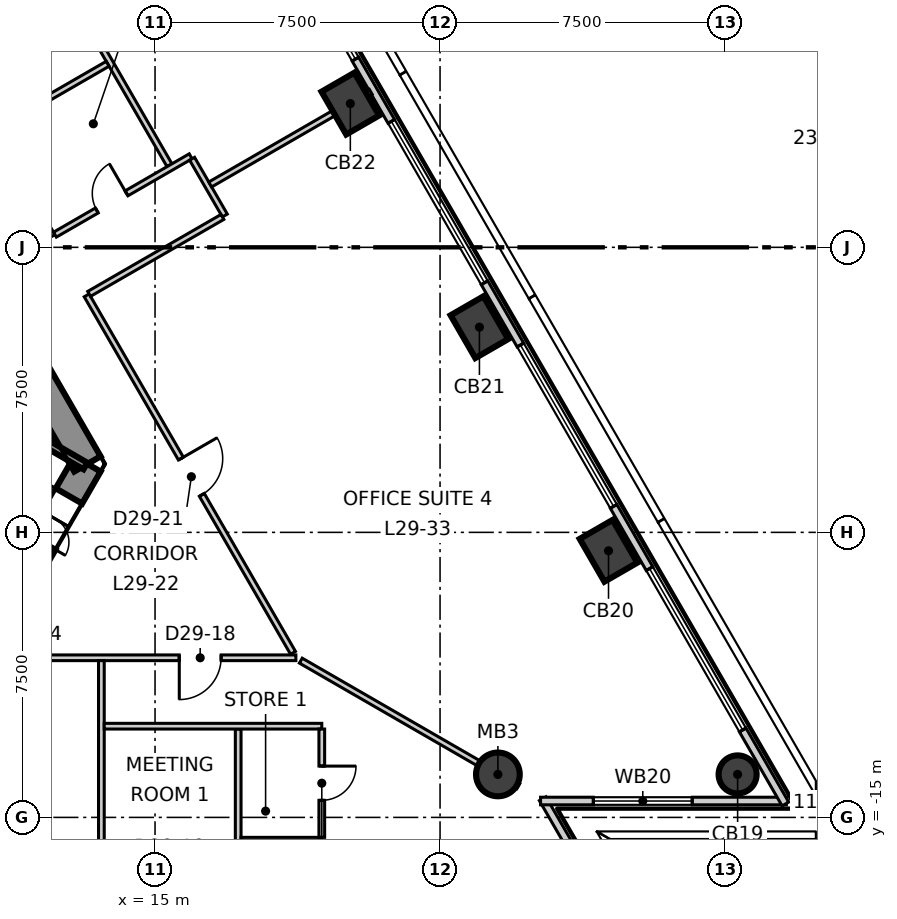
"""IFC4 building model, lengths in metres.
Left out: names, types, materials, properties, quantities, classifications, styles, units other than length and angle.
Written with IfcOpenShell. Run it as: python <this file> out.ifc"""

import sys

from ifc_helpers import new_model, si_unit, direction, frame, frame_2d, origin, origin_2d, place, context, subcontext, project, spatial, polyline, rectangle, circle, outline, extrude, element, fill, save


model = new_model("IFC4")
c1 = context("Model", 3, precision=1e-05, world=origin(), true_north=direction((0.0, 1.0)))
c2 = subcontext(c1, "Body", "Model", "MODEL_VIEW")
j1 = project(units=[si_unit("LENGTHUNIT", "METRE"), si_unit("PLANEANGLEUNIT", "RADIAN")], contexts=[c1])
p1 = place(None, origin())
s1 = spatial("IfcSite", under=j1, at=p1, CompositionType="ELEMENT")
p2 = place(p1, origin())
s2 = spatial("IfcBuilding", under=s1, at=p2, CompositionType="ELEMENT")
p3 = place(p2, frame((0.0, 0.0, 128.3)))
s3 = spatial("IfcBuildingStorey", under=s2, at=p3, CompositionType="ELEMENT", Elevation=128.3)
p4 = place(p3, frame((11.547, -8.6, -0.3), z_axis=(0.0, 0.0, 1.0), x_axis=(0.49987182685, 0.866099391942, 0.0)))
e1 = element("IfcWall", 1, at=p4, inside=s3, PredefinedType="SHEAR", context=c2, shape_type="SweptSolid", body=[
    extrude(outline(polyline([(-0.231, -0.4), (1.674, -0.4), (3.579, -0.4), (3.118, 0.4), (1.674, 0.4), (0.231, 0.4), (-0.231, -0.4)])), origin(), (0.0, 0.0, 1.0), 4.0),
])
p5 = place(p4, frame((0.974, 0.0, 0.3)))
e2 = element("IfcOpeningElement", 2, at=p5, cuts=e1, PredefinedType="OPENING", context=c2, shape_type="SweptSolid", body=[
    extrude(rectangle(XDim=1.4, YDim=2.1, at=frame_2d((0.7, 1.05))), frame((0.0, 0.41, 0.0), z_axis=(0.0, -1.0, 0.0), x_axis=(1.0, 0.0, 0.0)), (0.0, 0.0, 1.0), 0.82),
])
p6 = place(p3, frame((13.221, -5.7, -0.3), z_axis=(0.0, 0.0, 1.0), x_axis=(-0.499995765644, 0.866027848477, 0.0)))
e3 = element("IfcWall", 3, at=p6, inside=s3, PredefinedType="SHEAR", context=c2, shape_type="SweptSolid", body=[
    extrude(outline(polyline([(-0.231, -0.4), (1.732, -0.4), (3.695, -0.4), (5.658, -0.4), (7.621, -0.4), (9.584, -0.4), (11.547, -0.4), (13.51, -0.4), (15.473, -0.4), (17.436, -0.4), (19.399, -0.4), (21.362, -0.4), (23.325, -0.4), (22.863, 0.4), (20.977, 0.4), (19.091, 0.4), (17.205, 0.4), (15.319, 0.4), (13.433, 0.4), (11.547, 0.4), (9.661, 0.4), (7.775, 0.4), (5.889, 0.4), (4.003, 0.4), (2.117, 0.4), (0.231, 0.4), (-0.231, -0.4)])), origin(), (0.0, 0.0, 1.0), 4.0),
])
p7 = place(p6, frame((10.647, 0.0, 0.3)))
e4 = element("IfcOpeningElement", 4, at=p7, cuts=e3, PredefinedType="OPENING", context=c2, shape_type="SweptSolid", body=[
    extrude(rectangle(XDim=1.8, YDim=2.1, at=frame_2d((0.9, 1.05))), frame((0.0, 0.41, 0.0), z_axis=(0.0, -1.0, 0.0), x_axis=(1.0, 0.0, 0.0)), (0.0, 0.0, 1.0), 0.82),
])
p8 = place(p6, frame((17.721, 0.0, 0.3)))
e5 = element("IfcOpeningElement", 5, at=p8, cuts=e3, PredefinedType="OPENING", context=c2, shape_type="SweptSolid", body=[
    extrude(rectangle(XDim=0.9, YDim=2.1, at=frame_2d((0.45, 1.05))), frame((0.0, 0.41, 0.0), z_axis=(0.0, -1.0, 0.0), x_axis=(1.0, 0.0, 0.0)), (0.0, 0.0, 1.0), 0.82),
])
p9 = place(p3, frame((30.33, -13.869, -0.3), z_axis=(0.0, 0.0, 1.0), x_axis=(-0.5, 0.866025403784, 0.0)))
e6 = element("IfcColumn", 6, at=p9, inside=s3, PredefinedType="COLUMN", context=c2, shape_type="SweptSolid", body=[
    extrude(circle(Radius=0.5, at=origin_2d()), origin(), (0.0, 0.0, 1.0), 4.0),
])
for number, where, z_axis, x_axis in (
    (7, (26.933, -7.985, -0.3), (0.0, 0.0, 1.0), (-0.5, 0.866, 0.0)),
    (8, (23.536, -2.101, -0.3), (0.0, 0.0, 1.0), (-0.5, 0.866, 0.0)),
    (9, (20.139, 3.782, -0.3), (0.0, 0.0, 1.0), (-0.5, 0.866, 0.0)),
):
    element("IfcColumn", number, at=place(p3, frame(where, z_axis=z_axis, x_axis=x_axis)), inside=s3, PredefinedType="COLUMN", context=c2, shape_type="SweptSolid", body=[
        extrude(rectangle(XDim=1.3, YDim=1.0, at=origin_2d()), origin(), (0.0, 0.0, 1.0), 4.0),
    ])
p10 = place(p3, frame((24.022, -13.869, -0.3), z_axis=(0.0, 0.0, 1.0), x_axis=(1.0, 0.0, 0.0)))
e10 = element("IfcColumn", 10, at=p10, inside=s3, PredefinedType="COLUMN", context=c2, shape_type="SweptSolid", body=[
    extrude(circle(Radius=0.575, at=origin_2d()), origin(), (0.0, 0.0, 1.0), 4.0),
])
p11 = place(p3, frame((28.434, -20.11, 0.0), z_axis=(0.0, 0.0, 1.0), x_axis=(-0.499975110204, 0.866039773438, 0.0)))
e11 = element("IfcWall", 11, at=p11, inside=s3, PredefinedType="ELEMENTEDWALL", context=c2, shape_type="SweptSolid", body=[
    extrude(rectangle(XDim=6.469, YDim=0.2, at=frame_2d((3.234, 0.0))), origin(), (0.0, 0.0, 1.0), 3.7),
])
p12 = place(p11, frame((1.99, 0.0, 0.9)))
e12 = element("IfcOpeningElement", 12, at=p12, cuts=e11, PredefinedType="OPENING", context=c2, shape_type="SweptSolid", body=[
    extrude(rectangle(XDim=2.6, YDim=2.5, at=frame_2d((1.3, 1.25))), frame((0.0, 0.11, 0.0), z_axis=(0.0, -1.0, 0.0), x_axis=(1.0, 0.0, 0.0)), (0.0, 0.0, 1.0), 0.22),
])
p13 = place(p3, frame((25.145, -14.569, 0.0), z_axis=(0.0, 0.0, 1.0), x_axis=(1.0, 0.0, 0.0)))
e13 = element("IfcWall", 13, at=p13, inside=s3, PredefinedType="ELEMENTEDWALL", context=c2, shape_type="SweptSolid", body=[
    extrude(rectangle(XDim=6.468, YDim=0.2, at=frame_2d((3.234, 0.0))), origin(), (0.0, 0.0, 1.0), 3.7),
])
p14 = place(p13, frame((1.39, 0.0, 0.9)))
e14 = element("IfcOpeningElement", 14, at=p14, cuts=e13, PredefinedType="OPENING", context=c2, shape_type="SweptSolid", body=[
    extrude(rectangle(XDim=2.6, YDim=2.5, at=frame_2d((1.3, 1.25))), frame((0.0, 0.11, 0.0), z_axis=(0.0, -1.0, 0.0), x_axis=(1.0, 0.0, 0.0)), (0.0, 0.0, 1.0), 0.22),
])
p15 = place(p3, frame((31.588, -14.647, 0.0), z_axis=(0.0, 0.0, 1.0), x_axis=(-0.500005036527, 0.866022495925, 0.0)))
e15 = element("IfcWall", 15, at=p15, inside=s3, PredefinedType="ELEMENTEDWALL", context=c2, shape_type="SweptSolid", body=[
    extrude(rectangle(XDim=56.938, YDim=0.2, at=frame_2d((28.469, 0.0))), origin(), (0.0, 0.0, 1.0), 3.7),
])
p16 = place(p15, frame((2.25, 0.0, 0.9)))
e16 = element("IfcOpeningElement", 16, at=p16, cuts=e15, PredefinedType="OPENING", context=c2, shape_type="SweptSolid", body=[
    extrude(rectangle(XDim=4.9, YDim=2.5, at=frame_2d((2.45, 1.25))), frame((0.0, 0.11, 0.0), z_axis=(0.0, -1.0, 0.0), x_axis=(1.0, 0.0, 0.0)), (0.0, 0.0, 1.0), 0.22),
])
p17 = place(p15, frame((9.044, 0.0, 0.9)))
e17 = element("IfcOpeningElement", 17, at=p17, cuts=e15, PredefinedType="OPENING", context=c2, shape_type="SweptSolid", body=[
    extrude(rectangle(XDim=4.9, YDim=2.5, at=frame_2d((2.45, 1.25))), frame((0.0, 0.11, 0.0), z_axis=(0.0, -1.0, 0.0), x_axis=(1.0, 0.0, 0.0)), (0.0, 0.0, 1.0), 0.22),
])
p18 = place(p15, frame((15.838, 0.0, 0.9)))
e18 = element("IfcOpeningElement", 18, at=p18, cuts=e15, PredefinedType="OPENING", context=c2, shape_type="SweptSolid", body=[
    extrude(rectangle(XDim=4.9, YDim=2.5, at=frame_2d((2.45, 1.25))), frame((0.0, 0.11, 0.0), z_axis=(0.0, -1.0, 0.0), x_axis=(1.0, 0.0, 0.0)), (0.0, 0.0, 1.0), 0.22),
])
p19 = place(p15, frame((22.632, 0.0, 0.9)))
e19 = element("IfcOpeningElement", 19, at=p19, cuts=e15, PredefinedType="OPENING", context=c2, shape_type="SweptSolid", body=[
    extrude(rectangle(XDim=4.9, YDim=2.5, at=frame_2d((2.45, 1.25))), frame((0.0, 0.11, 0.0), z_axis=(0.0, -1.0, 0.0), x_axis=(1.0, 0.0, 0.0)), (0.0, 0.0, 1.0), 0.22),
])
p20 = place(p15, frame((29.426, 0.0, 0.9)))
e20 = element("IfcOpeningElement", 20, at=p20, cuts=e15, PredefinedType="OPENING", context=c2, shape_type="SweptSolid", body=[
    extrude(rectangle(XDim=4.9, YDim=2.5, at=frame_2d((2.45, 1.25))), frame((0.0, 0.11, 0.0), z_axis=(0.0, -1.0, 0.0), x_axis=(1.0, 0.0, 0.0)), (0.0, 0.0, 1.0), 0.22),
])
p21 = place(p15, frame((36.22, 0.0, 0.9)))
e21 = element("IfcOpeningElement", 21, at=p21, cuts=e15, PredefinedType="OPENING", context=c2, shape_type="SweptSolid", body=[
    extrude(rectangle(XDim=4.9, YDim=2.5, at=frame_2d((2.45, 1.25))), frame((0.0, 0.11, 0.0), z_axis=(0.0, -1.0, 0.0), x_axis=(1.0, 0.0, 0.0)), (0.0, 0.0, 1.0), 0.22),
])
p22 = place(p15, frame((43.014, 0.0, 0.9)))
e22 = element("IfcOpeningElement", 22, at=p22, cuts=e15, PredefinedType="OPENING", context=c2, shape_type="SweptSolid", body=[
    extrude(rectangle(XDim=4.9, YDim=2.5, at=frame_2d((2.45, 1.25))), frame((0.0, 0.11, 0.0), z_axis=(0.0, -1.0, 0.0), x_axis=(1.0, 0.0, 0.0)), (0.0, 0.0, 1.0), 0.22),
])
p23 = place(p15, frame((49.808, 0.0, 0.9)))
e23 = element("IfcOpeningElement", 23, at=p23, cuts=e15, PredefinedType="OPENING", context=c2, shape_type="SweptSolid", body=[
    extrude(rectangle(XDim=4.9, YDim=2.5, at=frame_2d((2.45, 1.25))), frame((0.0, 0.11, 0.0), z_axis=(0.0, -1.0, 0.0), x_axis=(1.0, 0.0, 0.0)), (0.0, 0.0, 1.0), 0.22),
])
p24 = place(p3, frame((0.901, -10.8, 0.0), z_axis=(0.0, 0.0, 1.0), x_axis=(1.0, 0.0, 0.0)))
e24 = element("IfcWall", 24, at=p24, inside=s3, PredefinedType="PARTITIONING", context=c2, shape_type="SweptSolid", body=[
    extrude(rectangle(XDim=17.805, YDim=0.15, at=frame_2d((8.903, 0.0))), origin(), (0.0, 0.0, 1.0), 3.7),
])
p25 = place(p24, frame((10.149, 0.0, 0.0)))
e25 = element("IfcOpeningElement", 25, at=p25, cuts=e24, PredefinedType="OPENING", context=c2, shape_type="SweptSolid", body=[
    extrude(rectangle(XDim=1.1, YDim=2.1, at=frame_2d((0.55, 1.05))), frame((0.0, 0.085, 0.0), z_axis=(0.0, -1.0, 0.0), x_axis=(1.0, 0.0, 0.0)), (0.0, 0.0, 1.0), 0.17),
])
p26 = place(p24, frame((4.349, 0.0, 0.0)))
e26 = element("IfcOpeningElement", 26, at=p26, cuts=e24, PredefinedType="OPENING", context=c2, shape_type="SweptSolid", body=[
    extrude(rectangle(XDim=0.9, YDim=2.1, at=frame_2d((0.45, 1.05))), frame((0.0, 0.085, 0.0), z_axis=(0.0, -1.0, 0.0), x_axis=(1.0, 0.0, 0.0)), (0.0, 0.0, 1.0), 0.17),
])
p27 = place(p24, frame((7.149, 0.0, 0.0)))
e27 = element("IfcOpeningElement", 27, at=p27, cuts=e24, PredefinedType="OPENING", context=c2, shape_type="SweptSolid", body=[
    extrude(rectangle(XDim=1.0, YDim=2.1, at=frame_2d((0.5, 1.05))), frame((0.0, 0.085, 0.0), z_axis=(0.0, -1.0, 0.0), x_axis=(1.0, 0.0, 0.0)), (0.0, 0.0, 1.0), 0.17),
])
p28 = place(p24, frame((14.737, 0.0, 0.0)))
e28 = element("IfcOpeningElement", 28, at=p28, cuts=e24, PredefinedType="OPENING", context=c2, shape_type="SweptSolid", body=[
    extrude(rectangle(XDim=1.1, YDim=2.1, at=frame_2d((0.55, 1.05))), frame((0.0, 0.085, 0.0), z_axis=(0.0, -1.0, 0.0), x_axis=(1.0, 0.0, 0.0)), (0.0, 0.0, 1.0), 0.17),
])
p29 = place(p3, frame((18.836, -10.875, 0.0), z_axis=(0.0, 0.0, 1.0), x_axis=(0.866045319897, -0.499965502695, 0.0)))
e29 = element("IfcWall", 29, at=p29, inside=s3, PredefinedType="PARTITIONING", context=c2, shape_type="SweptSolid", body=[
    extrude(rectangle(XDim=6.608, YDim=0.15, at=frame_2d((3.304, 0.0))), origin(), (0.0, 0.0, 1.0), 3.15),
])
p30 = place(p3, frame((0.076, 21.468, 0.0), z_axis=(0.0, 0.0, 1.0), x_axis=(0.50001203818, -0.866018453426, 0.0)))
e30 = element("IfcWall", 30, at=p30, inside=s3, PredefinedType="PARTITIONING", context=c2, shape_type="SweptSolid", body=[
    extrude(rectangle(XDim=24.448, YDim=0.15, at=frame_2d((12.224, 0.0))), origin(), (0.0, 0.0, 1.0), 3.7),
])
p31 = place(p30, frame((9.798, 0.0, 0.0)))
e31 = element("IfcOpeningElement", 31, at=p31, cuts=e30, PredefinedType="OPENING", context=c2, shape_type="SweptSolid", body=[
    extrude(rectangle(XDim=1.1, YDim=2.1, at=frame_2d((0.55, 1.05))), frame((0.0, 0.085, 0.0), z_axis=(0.0, -1.0, 0.0), x_axis=(1.0, 0.0, 0.0)), (0.0, 0.0, 1.0), 0.17),
])
p32 = place(p30, frame((19.198, 0.0, 0.0)))
e32 = element("IfcOpeningElement", 32, at=p32, cuts=e30, PredefinedType="OPENING", context=c2, shape_type="SweptSolid", body=[
    extrude(rectangle(XDim=0.9, YDim=2.1, at=frame_2d((0.45, 1.05))), frame((0.0, 0.085, 0.0), z_axis=(0.0, -1.0, 0.0), x_axis=(1.0, 0.0, 0.0)), (0.0, 0.0, 1.0), 0.17),
])
p33 = place(p30, frame((16.398, 0.0, 0.0)))
e33 = element("IfcOpeningElement", 33, at=p33, cuts=e30, PredefinedType="OPENING", context=c2, shape_type="SweptSolid", body=[
    extrude(rectangle(XDim=1.0, YDim=2.1, at=frame_2d((0.5, 1.05))), frame((0.0, 0.085, 0.0), z_axis=(0.0, -1.0, 0.0), x_axis=(1.0, 0.0, 0.0)), (0.0, 0.0, 1.0), 0.17),
])
p34 = place(p30, frame((1.815, 0.0, 0.0)))
e34 = element("IfcOpeningElement", 34, at=p34, cuts=e30, PredefinedType="OPENING", context=c2, shape_type="SweptSolid", body=[
    extrude(rectangle(XDim=1.1, YDim=2.1, at=frame_2d((0.55, 1.05))), frame((0.0, 0.085, 0.0), z_axis=(0.0, -1.0, 0.0), x_axis=(1.0, 0.0, 0.0)), (0.0, 0.0, 1.0), 0.17),
])
p35 = place(p3, frame((13.201, -1.264, 0.0), z_axis=(0.0, 0.0, 1.0), x_axis=(0.499973466559, -0.866040722332, 0.0)))
e35 = element("IfcWall", 35, at=p35, inside=s3, PredefinedType="PARTITIONING", context=c2, shape_type="SweptSolid", body=[
    extrude(rectangle(XDim=10.861, YDim=0.15, at=frame_2d((5.43, 0.0))), origin(), (0.0, 0.0, 1.0), 3.7),
])
p36 = place(p35, frame((4.96, 0.0, 0.0)))
e36 = element("IfcOpeningElement", 36, at=p36, cuts=e35, PredefinedType="OPENING", context=c2, shape_type="SweptSolid", body=[
    extrude(rectangle(XDim=1.1, YDim=2.1, at=frame_2d((0.55, 1.05))), frame((0.0, 0.085, 0.0), z_axis=(0.0, -1.0, 0.0), x_axis=(1.0, 0.0, 0.0)), (0.0, 0.0, 1.0), 0.17),
])
p37 = place(p3, frame((11.018, 9.717, 0.0), z_axis=(0.0, 0.0, 1.0), x_axis=(0.499888770922, -0.866089612399, 0.0)))
e37 = element("IfcWall", 37, at=p37, inside=s3, PredefinedType="PARTITIONING", context=c2, shape_type="SweptSolid", body=[
    extrude(rectangle(XDim=8.726, YDim=0.15, at=frame_2d((4.363, 0.0))), origin(), (0.0, 0.0, 1.0), 3.7),
])
p38 = place(p3, frame((10.765, 3.104, 0.0), z_axis=(0.0, 0.0, 1.0), x_axis=(0.866031223622, 0.49998991961, 0.0)))
e38 = element("IfcWall", 38, at=p38, inside=s3, PredefinedType="PARTITIONING", context=c2, shape_type="SweptSolid", body=[
    extrude(rectangle(XDim=3.45, YDim=0.15, at=frame_2d((1.725, 0.0))), origin(), (0.0, 0.0, 1.0), 3.7),
])
p39 = place(p3, frame((12.366, 0.333, 0.0), z_axis=(0.0, 0.0, 1.0), x_axis=(0.865997263264, 0.500048737644, 0.0)))
e39 = element("IfcWall", 39, at=p39, inside=s3, PredefinedType="PARTITIONING", context=c2, shape_type="SweptSolid", body=[
    extrude(rectangle(XDim=4.124, YDim=0.15, at=frame_2d((2.062, 0.0))), origin(), (0.0, 0.0, 1.0), 3.7),
])
p40 = place(p39, frame((1.274, 0.0, 0.0)))
e40 = element("IfcOpeningElement", 40, at=p40, cuts=e39, PredefinedType="OPENING", context=c2, shape_type="SweptSolid", body=[
    extrude(rectangle(XDim=0.9, YDim=2.1, at=frame_2d((0.45, 1.05))), frame((0.0, 0.085, 0.0), z_axis=(0.0, -1.0, 0.0), x_axis=(1.0, 0.0, 0.0)), (0.0, 0.0, 1.0), 0.17),
])
p41 = place(p3, frame((13.588, -19.952, 0.0), z_axis=(0.0, 0.0, 1.0), x_axis=(0.0, 1.0, 0.0)))
e41 = element("IfcWall", 41, at=p41, inside=s3, PredefinedType="PARTITIONING", context=c2, shape_type="SweptSolid", body=[
    extrude(rectangle(XDim=9.077, YDim=0.15, at=frame_2d((4.539, 0.0))), origin(), (0.0, 0.0, 1.0), 3.7),
])
p42 = place(p3, frame((15.975, 2.331, 0.0), z_axis=(0.0, 0.0, 1.0), x_axis=(0.499640762619, -0.866232710263, 0.0)))
e42 = element("IfcWall", 42, at=p42, inside=s3, PredefinedType="PARTITIONING", context=c2, shape_type="SweptSolid", body=[
    extrude(rectangle(XDim=1.725, YDim=0.15, at=frame_2d((0.862, 0.0))), origin(), (0.0, 0.0, 1.0), 3.7),
])
p43 = place(p3, frame((16.452, 1.654, 0.0), z_axis=(0.0, 0.0, 1.0), x_axis=(0.866097235509, 0.49987556316, 0.0)))
e43 = element("IfcWall", 43, at=p43, inside=s3, PredefinedType="PARTITIONING", context=c2, shape_type="SweptSolid", body=[
    extrude(rectangle(XDim=4.877, YDim=0.15, at=frame_2d((2.438, 0.0))), origin(), (0.0, 0.0, 1.0), 3.7),
])
p44 = place(p3, frame((13.266, -1.225, 0.0), z_axis=(0.0, 0.0, 1.0), x_axis=(0.866079163253, 0.499906874306, 0.0)))
e44 = element("IfcWall", 44, at=p44, inside=s3, PredefinedType="PARTITIONING", context=c2, shape_type="SweptSolid", body=[
    extrude(rectangle(XDim=4.049, YDim=0.15, at=frame_2d((2.024, 0.0))), origin(), (0.0, 0.0, 1.0), 3.7),
])
p45 = place(p3, frame((17.188, -16.325, 0.0), z_axis=(0.0, 0.0, 1.0), x_axis=(0.0, 1.0, 0.0)))
e45 = element("IfcWall", 45, at=p45, inside=s3, PredefinedType="PARTITIONING", context=c2, shape_type="SweptSolid", body=[
    extrude(rectangle(XDim=3.65, YDim=0.15, at=frame_2d((1.825, 0.0))), origin(), (0.0, 0.0, 1.0), 3.7),
])
p46 = place(p3, frame((13.663, -12.6, 0.0), z_axis=(0.0, 0.0, 1.0), x_axis=(1.0, 0.0, 0.0)))
e46 = element("IfcWall", 46, at=p46, inside=s3, PredefinedType="PARTITIONING", context=c2, shape_type="SweptSolid", body=[
    extrude(rectangle(XDim=5.725, YDim=0.15, at=frame_2d((2.862, 0.0))), origin(), (0.0, 0.0, 1.0), 3.7),
])
p47 = place(p3, frame((17.263, -15.6, 0.0), z_axis=(0.0, 0.0, 1.0), x_axis=(1.0, 0.0, 0.0)))
e47 = element("IfcWall", 47, at=p47, inside=s3, PredefinedType="PARTITIONING", context=c2, shape_type="SweptSolid", body=[
    extrude(rectangle(XDim=2.125, YDim=0.15, at=frame_2d((1.062, 0.0))), origin(), (0.0, 0.0, 1.0), 3.7),
])
p48 = place(p3, frame((19.388, -15.525, 0.0), z_axis=(0.0, 0.0, 1.0), x_axis=(0.0, 1.0, 0.0)))
e48 = element("IfcWall", 48, at=p48, inside=s3, PredefinedType="PARTITIONING", context=c2, shape_type="SweptSolid", body=[
    extrude(rectangle(XDim=2.85, YDim=0.15, at=frame_2d((1.425, 0.0))), origin(), (0.0, 0.0, 1.0), 3.7),
])
p49 = place(p48, frame((0.975, 0.0, 0.0)))
e49 = element("IfcOpeningElement", 49, at=p49, cuts=e48, PredefinedType="OPENING", context=c2, shape_type="SweptSolid", body=[
    extrude(rectangle(XDim=0.9, YDim=2.1, at=frame_2d((0.45, 1.05))), frame((0.0, 0.085, 0.0), z_axis=(0.0, -1.0, 0.0), x_axis=(1.0, 0.0, 0.0)), (0.0, 0.0, 1.0), 0.17),
])
p50 = place(p3, frame((6.529, -1.922, 0.0), z_axis=(0.0, 0.0, 1.0), x_axis=(0.866060938598, -0.499938446846, 0.0)))
e50 = element("IfcWall", 50, at=p50, inside=s3, PredefinedType="SOLIDWALL", context=c2, shape_type="SweptSolid", body=[
    extrude(rectangle(XDim=7.665, YDim=0.2, at=frame_2d((3.832, 0.0))), origin(), (0.0, 0.0, 1.0), 3.7),
])
p51 = place(p14, origin())
e51 = element("IfcWindow", 51, at=p51, inside=s3, PartitioningType="SINGLE_PANEL", PredefinedType="WINDOW", context=c2, shape_type="SweptSolid", body=[
    extrude(rectangle(XDim=2.6, YDim=2.5, at=frame_2d((1.3, 1.25))), frame((0.0, 0.03, 0.0), z_axis=(0.0, -1.0, 0.0), x_axis=(1.0, 0.0, 0.0)), (0.0, 0.0, 1.0), 0.06),
])
fill(e14, e51)
p52 = place(p16, origin())
e52 = element("IfcWindow", 52, at=p52, inside=s3, PartitioningType="SINGLE_PANEL", PredefinedType="WINDOW", context=c2, shape_type="SweptSolid", body=[
    extrude(rectangle(XDim=4.9, YDim=2.5, at=frame_2d((2.45, 1.25))), frame((0.0, 0.03, 0.0), z_axis=(0.0, -1.0, 0.0), x_axis=(1.0, 0.0, 0.0)), (0.0, 0.0, 1.0), 0.06),
])
fill(e16, e52)
p53 = place(p17, origin())
e53 = element("IfcWindow", 53, at=p53, inside=s3, PartitioningType="SINGLE_PANEL", PredefinedType="WINDOW", context=c2, shape_type="SweptSolid", body=[
    extrude(rectangle(XDim=4.9, YDim=2.5, at=frame_2d((2.45, 1.25))), frame((0.0, 0.03, 0.0), z_axis=(0.0, -1.0, 0.0), x_axis=(1.0, 0.0, 0.0)), (0.0, 0.0, 1.0), 0.06),
])
fill(e17, e53)
p54 = place(p18, origin())
e54 = element("IfcWindow", 54, at=p54, inside=s3, PartitioningType="SINGLE_PANEL", PredefinedType="WINDOW", context=c2, shape_type="SweptSolid", body=[
    extrude(rectangle(XDim=4.9, YDim=2.5, at=frame_2d((2.45, 1.25))), frame((0.0, 0.03, 0.0), z_axis=(0.0, -1.0, 0.0), x_axis=(1.0, 0.0, 0.0)), (0.0, 0.0, 1.0), 0.06),
])
fill(e18, e54)
p55 = place(p19, origin())
e55 = element("IfcWindow", 55, at=p55, inside=s3, PartitioningType="SINGLE_PANEL", PredefinedType="WINDOW", context=c2, shape_type="SweptSolid", body=[
    extrude(rectangle(XDim=4.9, YDim=2.5, at=frame_2d((2.45, 1.25))), frame((0.0, 0.03, 0.0), z_axis=(0.0, -1.0, 0.0), x_axis=(1.0, 0.0, 0.0)), (0.0, 0.0, 1.0), 0.06),
])
fill(e19, e55)
p56 = place(p28, origin())
e56 = element("IfcDoor", 56, at=p56, inside=s3, OperationType="SINGLE_SWING_LEFT", PredefinedType="DOOR", context=c2, shape_type="SweptSolid", body=[
    extrude(rectangle(XDim=1.1, YDim=2.1, at=frame_2d((0.55, 1.05))), frame((0.0, 0.025, 0.0), z_axis=(0.0, -1.0, 0.0), x_axis=(1.0, 0.0, 0.0)), (0.0, 0.0, 1.0), 0.05),
])
fill(e28, e56)
p57 = place(p49, origin())
e57 = element("IfcDoor", 57, at=p57, inside=s3, OperationType="SINGLE_SWING_RIGHT", PredefinedType="DOOR", context=c2, shape_type="SweptSolid", body=[
    extrude(rectangle(XDim=0.9, YDim=2.1, at=frame_2d((0.45, 1.05))), frame((0.0, 0.025, 0.0), z_axis=(0.0, -1.0, 0.0), x_axis=(1.0, 0.0, 0.0)), (0.0, 0.0, 1.0), 0.05),
])
fill(e49, e57)
p58 = place(p36, origin())
e58 = element("IfcDoor", 58, at=p58, inside=s3, OperationType="SINGLE_SWING_RIGHT", PredefinedType="DOOR", context=c2, shape_type="SweptSolid", body=[
    extrude(rectangle(XDim=1.1, YDim=2.1, at=frame_2d((0.55, 1.05))), frame((0.0, 0.025, 0.0), z_axis=(0.0, -1.0, 0.0), x_axis=(1.0, 0.0, 0.0)), (0.0, 0.0, 1.0), 0.05),
])
fill(e36, e58)
p59 = place(p40, origin())
e59 = element("IfcDoor", 59, at=p59, inside=s3, OperationType="SINGLE_SWING_LEFT", PredefinedType="DOOR", context=c2, shape_type="SweptSolid", body=[
    extrude(rectangle(XDim=0.9, YDim=2.1, at=frame_2d((0.45, 1.05))), frame((0.0, 0.025, 0.0), z_axis=(0.0, -1.0, 0.0), x_axis=(1.0, 0.0, 0.0)), (0.0, 0.0, 1.0), 0.05),
])
fill(e40, e59)
p60 = place(p5, origin())
e60 = element("IfcDoor", 60, at=p60, inside=s3, OperationType="DOUBLE_DOOR_SINGLE_SWING", PredefinedType="DOOR", context=c2, shape_type="SweptSolid", body=[
    extrude(rectangle(XDim=1.4, YDim=2.1, at=frame_2d((0.7, 1.05))), frame((0.0, 0.025, 0.0), z_axis=(0.0, -1.0, 0.0), x_axis=(1.0, 0.0, 0.0)), (0.0, 0.0, 1.0), 0.05),
])
fill(e2, e60)
save(model, sys.argv[1])
